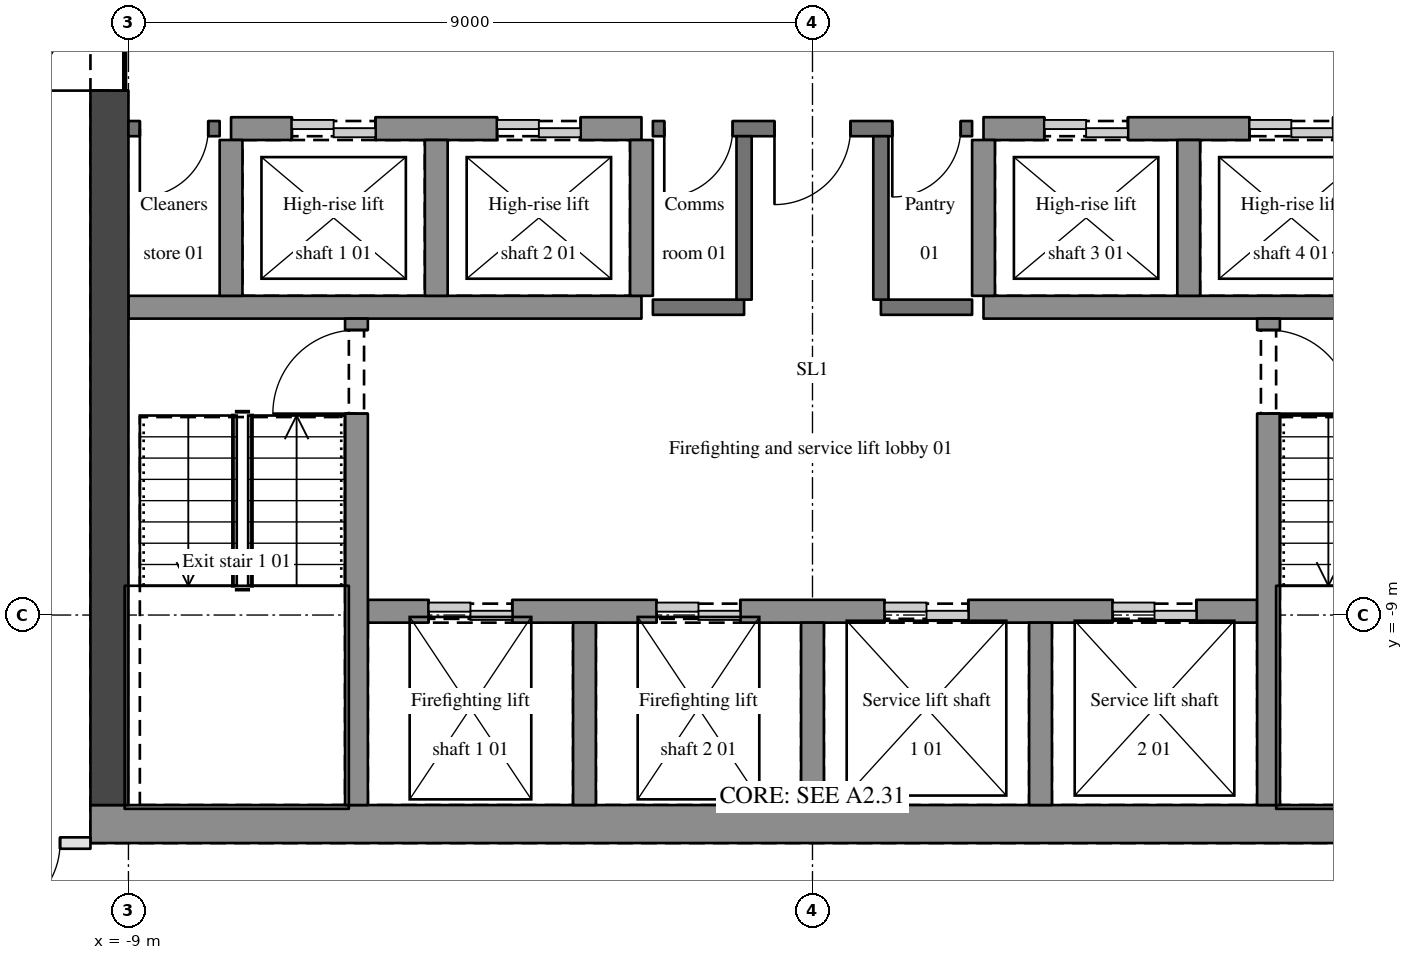
"""IFC4 building model, lengths in metres.
Left out: names, types, materials, properties, quantities, classifications, styles, units other than length and angle.
Written with IfcOpenShell. Run it as: python <this file> out.ifc"""

import sys

from ifc_helpers import new_model, si_unit, direction, frame, frame_2d, origin, place, context, subcontext, project, spatial, rectangle, extrude, element, fill, save


model = new_model("IFC4")
c1 = context("Model", 3, precision=1e-05, world=origin(), true_north=direction((0.0, 1.0)))
c2 = subcontext(c1, "Body", "Model", "MODEL_VIEW")
j1 = project(units=[si_unit("LENGTHUNIT", "METRE"), si_unit("PLANEANGLEUNIT", "RADIAN")], contexts=[c1])
p1 = place(None, origin())
s1 = spatial("IfcSite", under=j1, at=p1, CompositionType="ELEMENT")
p2 = place(p1, origin())
s2 = spatial("IfcBuilding", under=s1, at=p2, CompositionType="ELEMENT")
p3 = place(p2, frame((0.0, 0.0, 217.2)))
s3 = spatial("IfcBuildingStorey", under=s2, at=p3, CompositionType="ELEMENT", Elevation=217.2)
p4 = place(p3, frame((-9.5, -11.75, 0.0), z_axis=(0.0, 0.0, 1.0), x_axis=(1.0, 0.0, 0.0)))
e1 = element("IfcWall", 1, at=p4, inside=s3, PredefinedType="SHEAR", context=c2, shape_type="SweptSolid", body=[
    extrude(rectangle(XDim=19.0, YDim=0.5, at=frame_2d((9.5, 0.0))), origin(), (0.0, 0.0, 1.0), 3.15),
])
p5 = place(p3, frame((-9.25, -11.5, 0.0), z_axis=(0.0, 0.0, 1.0), x_axis=(0.0, 1.0, 0.0)))
e2 = element("IfcWall", 2, at=p5, inside=s3, PredefinedType="SHEAR", context=c2, shape_type="SweptSolid", body=[
    extrude(rectangle(XDim=11.65, YDim=0.5, at=frame_2d((5.825, 0.0))), origin(), (0.0, 0.0, 1.0), 3.15),
])
p6 = place(p5, frame((9.4, 0.0, 0.0)))
e3 = element("IfcOpeningElement", 3, at=p6, cuts=e2, PredefinedType="OPENING", context=c2, shape_type="SweptSolid", body=[
    extrude(rectangle(XDim=1.8, YDim=2.1, at=frame_2d((0.9, 1.05))), frame((0.0, 0.26, 0.0), z_axis=(0.0, -1.0, 0.0), x_axis=(1.0, 0.0, 0.0)), (0.0, 0.0, 1.0), 0.52),
])
p7 = place(p3, frame((-9.5, -12.0, 0.0), z_axis=(0.0, 0.0, 1.0), x_axis=(-1.0, 0.0, 0.0)))
e4 = element("IfcWall", 4, at=p7, inside=s3, PredefinedType="PARTITIONING", context=c2, shape_type="SweptSolid", body=[
    extrude(rectangle(XDim=1.875, YDim=0.15, at=frame_2d((0.938, 0.0))), origin(), (0.0, 0.0, 1.0), 2.21),
])
p8 = place(p7, frame((0.4, 0.0, 0.0)))
e5 = element("IfcOpeningElement", 5, at=p8, cuts=e4, PredefinedType="OPENING", context=c2, shape_type="SweptSolid", body=[
    extrude(rectangle(XDim=1.0, YDim=2.1, at=frame_2d((0.5, 1.05))), frame((0.0, 0.085, 0.0), z_axis=(0.0, -1.0, 0.0), x_axis=(1.0, 0.0, 0.0)), (0.0, 0.0, 1.0), 0.17),
])
p9 = place(p3, frame((-5.85, -8.95, 0.0), z_axis=(0.0, 0.0, 1.0), x_axis=(1.0, 0.0, 0.0)))
e6 = element("IfcWall", 6, at=p9, inside=s3, PredefinedType="SHEAR", context=c2, shape_type="SweptSolid", body=[
    extrude(rectangle(XDim=11.7, YDim=0.3, at=frame_2d((5.85, 0.0))), origin(), (0.0, 0.0, 1.0), 3.15),
])
p10 = place(p9, frame((0.8, 0.0, 0.0)))
e7 = element("IfcOpeningElement", 7, at=p10, cuts=e6, PredefinedType="OPENING", context=c2, shape_type="SweptSolid", body=[
    extrude(rectangle(XDim=1.1, YDim=2.1, at=frame_2d((0.55, 1.05))), frame((0.0, 0.16, 0.0), z_axis=(0.0, -1.0, 0.0), x_axis=(1.0, 0.0, 0.0)), (0.0, 0.0, 1.0), 0.32),
])
p11 = place(p9, frame((3.8, 0.0, 0.0)))
e8 = element("IfcOpeningElement", 8, at=p11, cuts=e6, PredefinedType="OPENING", context=c2, shape_type="SweptSolid", body=[
    extrude(rectangle(XDim=1.1, YDim=2.1, at=frame_2d((0.55, 1.05))), frame((0.0, 0.16, 0.0), z_axis=(0.0, -1.0, 0.0), x_axis=(1.0, 0.0, 0.0)), (0.0, 0.0, 1.0), 0.32),
])
p12 = place(p9, frame((6.8, 0.0, 0.0)))
e9 = element("IfcOpeningElement", 9, at=p12, cuts=e6, PredefinedType="OPENING", context=c2, shape_type="SweptSolid", body=[
    extrude(rectangle(XDim=1.1, YDim=2.1, at=frame_2d((0.55, 1.05))), frame((0.0, 0.16, 0.0), z_axis=(0.0, -1.0, 0.0), x_axis=(1.0, 0.0, 0.0)), (0.0, 0.0, 1.0), 0.32),
])
p13 = place(p9, frame((9.8, 0.0, 0.0)))
e10 = element("IfcOpeningElement", 10, at=p13, cuts=e6, PredefinedType="OPENING", context=c2, shape_type="SweptSolid", body=[
    extrude(rectangle(XDim=1.1, YDim=2.1, at=frame_2d((0.55, 1.05))), frame((0.0, 0.16, 0.0), z_axis=(0.0, -1.0, 0.0), x_axis=(1.0, 0.0, 0.0)), (0.0, 0.0, 1.0), 0.32),
])
p14 = place(p3, frame((-9.0, -4.95, 0.0), z_axis=(0.0, 0.0, 1.0), x_axis=(1.0, 0.0, 0.0)))
e11 = element("IfcWall", 11, at=p14, inside=s3, PredefinedType="SHEAR", context=c2, shape_type="SweptSolid", body=[
    extrude(rectangle(XDim=6.75, YDim=0.3, at=frame_2d((3.375, 0.0))), origin(), (0.0, 0.0, 1.0), 3.15),
])
for number, where, z_axis, x_axis in (
    (12, (-2.1, -4.95, 0.0), (0.0, 0.0, 1.0), (1.0, 0.0, 0.0)),
    (13, (0.9, -4.95, 0.0), (0.0, 0.0, 1.0), (1.0, 0.0, 0.0)),
):
    element("IfcWall", number, at=place(p3, frame(where, z_axis=z_axis, x_axis=x_axis)), inside=s3, PredefinedType="SOLIDWALL", context=c2, shape_type="SweptSolid", body=[
        extrude(rectangle(XDim=1.2, YDim=0.2, at=frame_2d((0.6, 0.0))), origin(), (0.0, 0.0, 1.0), 2.85),
    ])
p15 = place(p3, frame((2.25, -4.95, 0.0), z_axis=(0.0, 0.0, 1.0), x_axis=(1.0, 0.0, 0.0)))
e14 = element("IfcWall", 14, at=p15, inside=s3, PredefinedType="SHEAR", context=c2, shape_type="SweptSolid", body=[
    extrude(rectangle(XDim=6.75, YDim=0.3, at=frame_2d((3.375, 0.0))), origin(), (0.0, 0.0, 1.0), 3.15),
])
p16 = place(p3, frame((-7.8, -2.6, 0.0), z_axis=(0.0, 0.0, 1.0), x_axis=(-1.0, 0.0, 0.0)))
e15 = element("IfcWall", 15, at=p16, inside=s3, PredefinedType="SOLIDWALL", context=c2, shape_type="SweptSolid", body=[
    extrude(rectangle(XDim=1.2, YDim=0.2, at=frame_2d((0.6, 0.0))), origin(), (0.0, 0.0, 1.0), 2.85),
])
p17 = place(p16, frame((0.15, 0.0, 0.0)))
e16 = element("IfcOpeningElement", 16, at=p17, cuts=e15, PredefinedType="OPENING", context=c2, shape_type="SweptSolid", body=[
    extrude(rectangle(XDim=0.9, YDim=2.1, at=frame_2d((0.45, 1.05))), frame((0.0, 0.11, 0.0), z_axis=(0.0, -1.0, 0.0), x_axis=(1.0, 0.0, 0.0)), (0.0, 0.0, 1.0), 0.22),
])
p18 = place(p3, frame((-7.65, -2.6, 0.0), z_axis=(0.0, 0.0, 1.0), x_axis=(1.0, 0.0, 0.0)))
e17 = element("IfcWall", 17, at=p18, inside=s3, PredefinedType="SHEAR", context=c2, shape_type="SweptSolid", body=[
    extrude(rectangle(XDim=5.4, YDim=0.3, at=frame_2d((2.7, 0.0))), origin(), (0.0, 0.0, 1.0), 3.15),
])
p19 = place(p18, frame((0.8, 0.0, 0.0)))
e18 = element("IfcOpeningElement", 18, at=p19, cuts=e17, PredefinedType="OPENING", context=c2, shape_type="SweptSolid", body=[
    extrude(rectangle(XDim=1.1, YDim=2.1, at=frame_2d((0.55, 1.05))), frame((0.0, 0.16, 0.0), z_axis=(0.0, -1.0, 0.0), x_axis=(1.0, 0.0, 0.0)), (0.0, 0.0, 1.0), 0.32),
])
p20 = place(p18, frame((3.5, 0.0, 0.0)))
e19 = element("IfcOpeningElement", 19, at=p20, cuts=e17, PredefinedType="OPENING", context=c2, shape_type="SweptSolid", body=[
    extrude(rectangle(XDim=1.1, YDim=2.1, at=frame_2d((0.55, 1.05))), frame((0.0, 0.16, 0.0), z_axis=(0.0, -1.0, 0.0), x_axis=(1.0, 0.0, 0.0)), (0.0, 0.0, 1.0), 0.32),
])
p21 = place(p3, frame((2.1, -2.6, 0.0), z_axis=(0.0, 0.0, 1.0), x_axis=(-1.0, 0.0, 0.0)))
e20 = element("IfcWall", 20, at=p21, inside=s3, PredefinedType="SOLIDWALL", context=c2, shape_type="SweptSolid", body=[
    extrude(rectangle(XDim=4.2, YDim=0.2, at=frame_2d((2.1, 0.0))), origin(), (0.0, 0.0, 1.0), 2.85),
])
p22 = place(p21, frame((1.6, 0.0, 0.0)))
e21 = element("IfcOpeningElement", 21, at=p22, cuts=e20, PredefinedType="OPENING", context=c2, shape_type="SweptSolid", body=[
    extrude(rectangle(XDim=1.0, YDim=2.1, at=frame_2d((0.5, 1.05))), frame((0.0, 0.11, 0.0), z_axis=(0.0, -1.0, 0.0), x_axis=(1.0, 0.0, 0.0)), (0.0, 0.0, 1.0), 0.22),
])
p23 = place(p21, frame((3.15, 0.0, 0.0)))
e22 = element("IfcOpeningElement", 22, at=p23, cuts=e20, PredefinedType="OPENING", context=c2, shape_type="SweptSolid", body=[
    extrude(rectangle(XDim=0.9, YDim=2.1, at=frame_2d((0.45, 1.05))), frame((0.0, 0.11, 0.0), z_axis=(0.0, -1.0, 0.0), x_axis=(1.0, 0.0, 0.0)), (0.0, 0.0, 1.0), 0.22),
])
p24 = place(p21, frame((0.15, 0.0, 0.0)))
e23 = element("IfcOpeningElement", 23, at=p24, cuts=e20, PredefinedType="OPENING", context=c2, shape_type="SweptSolid", body=[
    extrude(rectangle(XDim=0.9, YDim=2.1, at=frame_2d((0.45, 1.05))), frame((0.0, 0.11, 0.0), z_axis=(0.0, -1.0, 0.0), x_axis=(1.0, 0.0, 0.0)), (0.0, 0.0, 1.0), 0.22),
])
p25 = place(p3, frame((2.25, -2.6, 0.0), z_axis=(0.0, 0.0, 1.0), x_axis=(1.0, 0.0, 0.0)))
e24 = element("IfcWall", 24, at=p25, inside=s3, PredefinedType="SHEAR", context=c2, shape_type="SweptSolid", body=[
    extrude(rectangle(XDim=5.4, YDim=0.3, at=frame_2d((2.7, 0.0))), origin(), (0.0, 0.0, 1.0), 3.15),
])
p26 = place(p25, frame((0.8, 0.0, 0.0)))
e25 = element("IfcOpeningElement", 25, at=p26, cuts=e24, PredefinedType="OPENING", context=c2, shape_type="SweptSolid", body=[
    extrude(rectangle(XDim=1.1, YDim=2.1, at=frame_2d((0.55, 1.05))), frame((0.0, 0.16, 0.0), z_axis=(0.0, -1.0, 0.0), x_axis=(1.0, 0.0, 0.0)), (0.0, 0.0, 1.0), 0.32),
])
p27 = place(p25, frame((3.5, 0.0, 0.0)))
e26 = element("IfcOpeningElement", 26, at=p27, cuts=e24, PredefinedType="OPENING", context=c2, shape_type="SweptSolid", body=[
    extrude(rectangle(XDim=1.1, YDim=2.1, at=frame_2d((0.55, 1.05))), frame((0.0, 0.16, 0.0), z_axis=(0.0, -1.0, 0.0), x_axis=(1.0, 0.0, 0.0)), (0.0, 0.0, 1.0), 0.32),
])
p28 = place(p3, frame((-7.65, -4.8, 0.0), z_axis=(0.0, 0.0, 1.0), x_axis=(0.0, 1.0, 0.0)))
e27 = element("IfcWall", 27, at=p28, inside=s3, PredefinedType="SHEAR", context=c2, shape_type="SweptSolid", body=[
    extrude(rectangle(XDim=2.05, YDim=0.3, at=frame_2d((1.025, 0.0))), origin(), (0.0, 0.0, 1.0), 3.15),
])
p29 = place(p3, frame((-6.0, -11.5, 0.0), z_axis=(0.0, 0.0, 1.0), x_axis=(0.0, 1.0, 0.0)))
e28 = element("IfcWall", 28, at=p29, inside=s3, PredefinedType="SHEAR", context=c2, shape_type="SweptSolid", body=[
    extrude(rectangle(XDim=6.4, YDim=0.3, at=frame_2d((3.2, 0.0))), origin(), (0.0, 0.0, 1.0), 3.15),
])
p30 = place(p29, frame((5.15, 0.0, 0.0)))
e29 = element("IfcOpeningElement", 29, at=p30, cuts=e28, PredefinedType="OPENING", context=c2, shape_type="SweptSolid", body=[
    extrude(rectangle(XDim=1.1, YDim=2.1, at=frame_2d((0.55, 1.05))), frame((0.0, 0.16, 0.0), z_axis=(0.0, -1.0, 0.0), x_axis=(1.0, 0.0, 0.0)), (0.0, 0.0, 1.0), 0.32),
])
p31 = place(p3, frame((-4.95, -4.8, 0.0), z_axis=(0.0, 0.0, 1.0), x_axis=(0.0, 1.0, 0.0)))
e30 = element("IfcWall", 30, at=p31, inside=s3, PredefinedType="SHEAR", context=c2, shape_type="SweptSolid", body=[
    extrude(rectangle(XDim=2.05, YDim=0.3, at=frame_2d((1.025, 0.0))), origin(), (0.0, 0.0, 1.0), 3.15),
])
p32 = place(p3, frame((-3.0, -11.5, 0.0), z_axis=(0.0, 0.0, 1.0), x_axis=(0.0, 1.0, 0.0)))
e31 = element("IfcWall", 31, at=p32, inside=s3, PredefinedType="SHEAR", context=c2, shape_type="SweptSolid", body=[
    extrude(rectangle(XDim=2.4, YDim=0.3, at=frame_2d((1.2, 0.0))), origin(), (0.0, 0.0, 1.0), 3.15),
])
p33 = place(p3, frame((-2.25, -4.8, 0.0), z_axis=(0.0, 0.0, 1.0), x_axis=(0.0, 1.0, 0.0)))
e32 = element("IfcWall", 32, at=p33, inside=s3, PredefinedType="SHEAR", context=c2, shape_type="SweptSolid", body=[
    extrude(rectangle(XDim=2.05, YDim=0.3, at=frame_2d((1.025, 0.0))), origin(), (0.0, 0.0, 1.0), 3.15),
])
p34 = place(p3, frame((-0.9, -4.85, 0.0), z_axis=(0.0, 0.0, 1.0), x_axis=(0.0, 1.0, 0.0)))
e33 = element("IfcWall", 33, at=p34, inside=s3, PredefinedType="SOLIDWALL", context=c2, shape_type="SweptSolid", body=[
    extrude(rectangle(XDim=2.15, YDim=0.2, at=frame_2d((1.075, 0.0))), origin(), (0.0, 0.0, 1.0), 2.85),
])
p35 = place(p3, frame((0.0, -11.5, 0.0), z_axis=(0.0, 0.0, 1.0), x_axis=(0.0, 1.0, 0.0)))
e34 = element("IfcWall", 34, at=p35, inside=s3, PredefinedType="SHEAR", context=c2, shape_type="SweptSolid", body=[
    extrude(rectangle(XDim=2.4, YDim=0.3, at=frame_2d((1.2, 0.0))), origin(), (0.0, 0.0, 1.0), 3.15),
])
p36 = place(p3, frame((0.9, -4.85, 0.0), z_axis=(0.0, 0.0, 1.0), x_axis=(0.0, 1.0, 0.0)))
e35 = element("IfcWall", 35, at=p36, inside=s3, PredefinedType="SOLIDWALL", context=c2, shape_type="SweptSolid", body=[
    extrude(rectangle(XDim=2.15, YDim=0.2, at=frame_2d((1.075, 0.0))), origin(), (0.0, 0.0, 1.0), 2.85),
])
p37 = place(p3, frame((2.25, -4.8, 0.0), z_axis=(0.0, 0.0, 1.0), x_axis=(0.0, 1.0, 0.0)))
e36 = element("IfcWall", 36, at=p37, inside=s3, PredefinedType="SHEAR", context=c2, shape_type="SweptSolid", body=[
    extrude(rectangle(XDim=2.05, YDim=0.3, at=frame_2d((1.025, 0.0))), origin(), (0.0, 0.0, 1.0), 3.15),
])
p38 = place(p3, frame((3.0, -11.5, 0.0), z_axis=(0.0, 0.0, 1.0), x_axis=(0.0, 1.0, 0.0)))
e37 = element("IfcWall", 37, at=p38, inside=s3, PredefinedType="SHEAR", context=c2, shape_type="SweptSolid", body=[
    extrude(rectangle(XDim=2.4, YDim=0.3, at=frame_2d((1.2, 0.0))), origin(), (0.0, 0.0, 1.0), 3.15),
])
p39 = place(p3, frame((4.95, -4.8, 0.0), z_axis=(0.0, 0.0, 1.0), x_axis=(0.0, 1.0, 0.0)))
e38 = element("IfcWall", 38, at=p39, inside=s3, PredefinedType="SHEAR", context=c2, shape_type="SweptSolid", body=[
    extrude(rectangle(XDim=2.05, YDim=0.3, at=frame_2d((1.025, 0.0))), origin(), (0.0, 0.0, 1.0), 3.15),
])
p40 = place(p3, frame((6.0, -5.1, 0.0), z_axis=(0.0, 0.0, 1.0), x_axis=(0.0, -1.0, 0.0)))
e39 = element("IfcWall", 39, at=p40, inside=s3, PredefinedType="SHEAR", context=c2, shape_type="SweptSolid", body=[
    extrude(rectangle(XDim=6.4, YDim=0.3, at=frame_2d((3.2, 0.0))), origin(), (0.0, 0.0, 1.0), 3.15),
])
p41 = place(p40, frame((0.15, 0.0, 0.0)))
e40 = element("IfcOpeningElement", 40, at=p41, cuts=e39, PredefinedType="OPENING", context=c2, shape_type="SweptSolid", body=[
    extrude(rectangle(XDim=1.1, YDim=2.1, at=frame_2d((0.55, 1.05))), frame((0.0, 0.16, 0.0), z_axis=(0.0, -1.0, 0.0), x_axis=(1.0, 0.0, 0.0)), (0.0, 0.0, 1.0), 0.32),
])
p42 = place(p6, origin())
e41 = element("IfcDoor", 41, at=p42, inside=s3, OperationType="DOUBLE_DOOR_SINGLE_SWING", PredefinedType="DOOR", context=c2, shape_type="SweptSolid", body=[
    extrude(rectangle(XDim=1.8, YDim=2.1, at=frame_2d((0.9, 1.05))), frame((0.0, 0.025, 0.0), z_axis=(0.0, -1.0, 0.0), x_axis=(1.0, 0.0, 0.0)), (0.0, 0.0, 1.0), 0.05),
])
fill(e3, e41)
p43 = place(p22, origin())
e42 = element("IfcDoor", 42, at=p43, inside=s3, OperationType="SINGLE_SWING_RIGHT", PredefinedType="DOOR", context=c2, shape_type="SweptSolid", body=[
    extrude(rectangle(XDim=1.0, YDim=2.1, at=frame_2d((0.5, 1.05))), frame((0.0, 0.025, 0.0), z_axis=(0.0, -1.0, 0.0), x_axis=(1.0, 0.0, 0.0)), (0.0, 0.0, 1.0), 0.05),
])
fill(e21, e42)
p44 = place(p30, origin())
e43 = element("IfcDoor", 43, at=p44, inside=s3, OperationType="SINGLE_SWING_LEFT", PredefinedType="DOOR", context=c2, shape_type="SweptSolid", body=[
    extrude(rectangle(XDim=1.1, YDim=2.1, at=frame_2d((0.55, 1.05))), frame((0.0, 0.025, 0.0), z_axis=(0.0, -1.0, 0.0), x_axis=(1.0, 0.0, 0.0)), (0.0, 0.0, 1.0), 0.05),
])
fill(e29, e43)
p45 = place(p41, origin())
e44 = element("IfcDoor", 44, at=p45, inside=s3, OperationType="SINGLE_SWING_RIGHT", PredefinedType="DOOR", context=c2, shape_type="SweptSolid", body=[
    extrude(rectangle(XDim=1.1, YDim=2.1, at=frame_2d((0.55, 1.05))), frame((0.0, 0.025, 0.0), z_axis=(0.0, -1.0, 0.0), x_axis=(1.0, 0.0, 0.0)), (0.0, 0.0, 1.0), 0.05),
])
fill(e40, e44)
p46 = place(p23, origin())
e45 = element("IfcDoor", 45, at=p46, inside=s3, OperationType="SINGLE_SWING_RIGHT", PredefinedType="DOOR", context=c2, shape_type="SweptSolid", body=[
    extrude(rectangle(XDim=0.9, YDim=2.1, at=frame_2d((0.45, 1.05))), frame((0.0, 0.025, 0.0), z_axis=(0.0, -1.0, 0.0), x_axis=(1.0, 0.0, 0.0)), (0.0, 0.0, 1.0), 0.05),
])
fill(e22, e45)
p47 = place(p24, origin())
e46 = element("IfcDoor", 46, at=p47, inside=s3, OperationType="SINGLE_SWING_RIGHT", PredefinedType="DOOR", context=c2, shape_type="SweptSolid", body=[
    extrude(rectangle(XDim=0.9, YDim=2.1, at=frame_2d((0.45, 1.05))), frame((0.0, 0.025, 0.0), z_axis=(0.0, -1.0, 0.0), x_axis=(1.0, 0.0, 0.0)), (0.0, 0.0, 1.0), 0.05),
])
fill(e23, e46)
p48 = place(p17, origin())
e47 = element("IfcDoor", 47, at=p48, inside=s3, OperationType="SINGLE_SWING_RIGHT", PredefinedType="DOOR", context=c2, shape_type="SweptSolid", body=[
    extrude(rectangle(XDim=0.9, YDim=2.1, at=frame_2d((0.45, 1.05))), frame((0.0, 0.025, 0.0), z_axis=(0.0, -1.0, 0.0), x_axis=(1.0, 0.0, 0.0)), (0.0, 0.0, 1.0), 0.05),
])
fill(e16, e47)
p49 = place(p8, origin())
e48 = element("IfcDoor", 48, at=p49, inside=s3, OperationType="SINGLE_SWING_RIGHT", PredefinedType="DOOR", context=c2, shape_type="SweptSolid", body=[
    extrude(rectangle(XDim=1.0, YDim=2.1, at=frame_2d((0.5, 1.05))), frame((0.0, 0.025, 0.0), z_axis=(0.0, -1.0, 0.0), x_axis=(1.0, 0.0, 0.0)), (0.0, 0.0, 1.0), 0.05),
])
fill(e5, e48)
p50 = place(p10, origin())
e49 = element("IfcDoor", 49, at=p50, inside=s3, OperationType="DOUBLE_DOOR_SLIDING", PredefinedType="DOOR", context=c2, shape_type="SweptSolid", body=[
    extrude(rectangle(XDim=1.1, YDim=2.1, at=frame_2d((0.55, 1.05))), frame((0.0, 0.025, 0.0), z_axis=(0.0, -1.0, 0.0), x_axis=(1.0, 0.0, 0.0)), (0.0, 0.0, 1.0), 0.05),
])
fill(e7, e49)
p51 = place(p11, origin())
e50 = element("IfcDoor", 50, at=p51, inside=s3, OperationType="DOUBLE_DOOR_SLIDING", PredefinedType="DOOR", context=c2, shape_type="SweptSolid", body=[
    extrude(rectangle(XDim=1.1, YDim=2.1, at=frame_2d((0.55, 1.05))), frame((0.0, 0.025, 0.0), z_axis=(0.0, -1.0, 0.0), x_axis=(1.0, 0.0, 0.0)), (0.0, 0.0, 1.0), 0.05),
])
fill(e8, e50)
p52 = place(p19, origin())
e51 = element("IfcDoor", 51, at=p52, inside=s3, OperationType="DOUBLE_DOOR_SLIDING", PredefinedType="DOOR", context=c2, shape_type="SweptSolid", body=[
    extrude(rectangle(XDim=1.1, YDim=2.1, at=frame_2d((0.55, 1.05))), frame((0.0, 0.025, 0.0), z_axis=(0.0, -1.0, 0.0), x_axis=(1.0, 0.0, 0.0)), (0.0, 0.0, 1.0), 0.05),
])
fill(e18, e51)
p53 = place(p20, origin())
e52 = element("IfcDoor", 52, at=p53, inside=s3, OperationType="DOUBLE_DOOR_SLIDING", PredefinedType="DOOR", context=c2, shape_type="SweptSolid", body=[
    extrude(rectangle(XDim=1.1, YDim=2.1, at=frame_2d((0.55, 1.05))), frame((0.0, 0.025, 0.0), z_axis=(0.0, -1.0, 0.0), x_axis=(1.0, 0.0, 0.0)), (0.0, 0.0, 1.0), 0.05),
])
fill(e19, e52)
p54 = place(p26, origin())
e53 = element("IfcDoor", 53, at=p54, inside=s3, OperationType="DOUBLE_DOOR_SLIDING", PredefinedType="DOOR", context=c2, shape_type="SweptSolid", body=[
    extrude(rectangle(XDim=1.1, YDim=2.1, at=frame_2d((0.55, 1.05))), frame((0.0, 0.025, 0.0), z_axis=(0.0, -1.0, 0.0), x_axis=(1.0, 0.0, 0.0)), (0.0, 0.0, 1.0), 0.05),
])
fill(e25, e53)
p55 = place(p27, origin())
e54 = element("IfcDoor", 54, at=p55, inside=s3, OperationType="DOUBLE_DOOR_SLIDING", PredefinedType="DOOR", context=c2, shape_type="SweptSolid", body=[
    extrude(rectangle(XDim=1.1, YDim=2.1, at=frame_2d((0.55, 1.05))), frame((0.0, 0.025, 0.0), z_axis=(0.0, -1.0, 0.0), x_axis=(1.0, 0.0, 0.0)), (0.0, 0.0, 1.0), 0.05),
])
fill(e26, e54)
p56 = place(p12, origin())
e55 = element("IfcDoor", 55, at=p56, inside=s3, OperationType="DOUBLE_DOOR_SLIDING", PredefinedType="DOOR", context=c2, shape_type="SweptSolid", body=[
    extrude(rectangle(XDim=1.1, YDim=2.1, at=frame_2d((0.55, 1.05))), frame((0.0, 0.025, 0.0), z_axis=(0.0, -1.0, 0.0), x_axis=(1.0, 0.0, 0.0)), (0.0, 0.0, 1.0), 0.05),
])
fill(e9, e55)
p57 = place(p13, origin())
e56 = element("IfcDoor", 56, at=p57, inside=s3, OperationType="DOUBLE_DOOR_SLIDING", PredefinedType="DOOR", context=c2, shape_type="SweptSolid", body=[
    extrude(rectangle(XDim=1.1, YDim=2.1, at=frame_2d((0.55, 1.05))), frame((0.0, 0.025, 0.0), z_axis=(0.0, -1.0, 0.0), x_axis=(1.0, 0.0, 0.0)), (0.0, 0.0, 1.0), 0.05),
])
fill(e10, e56)
save(model, sys.argv[1])
